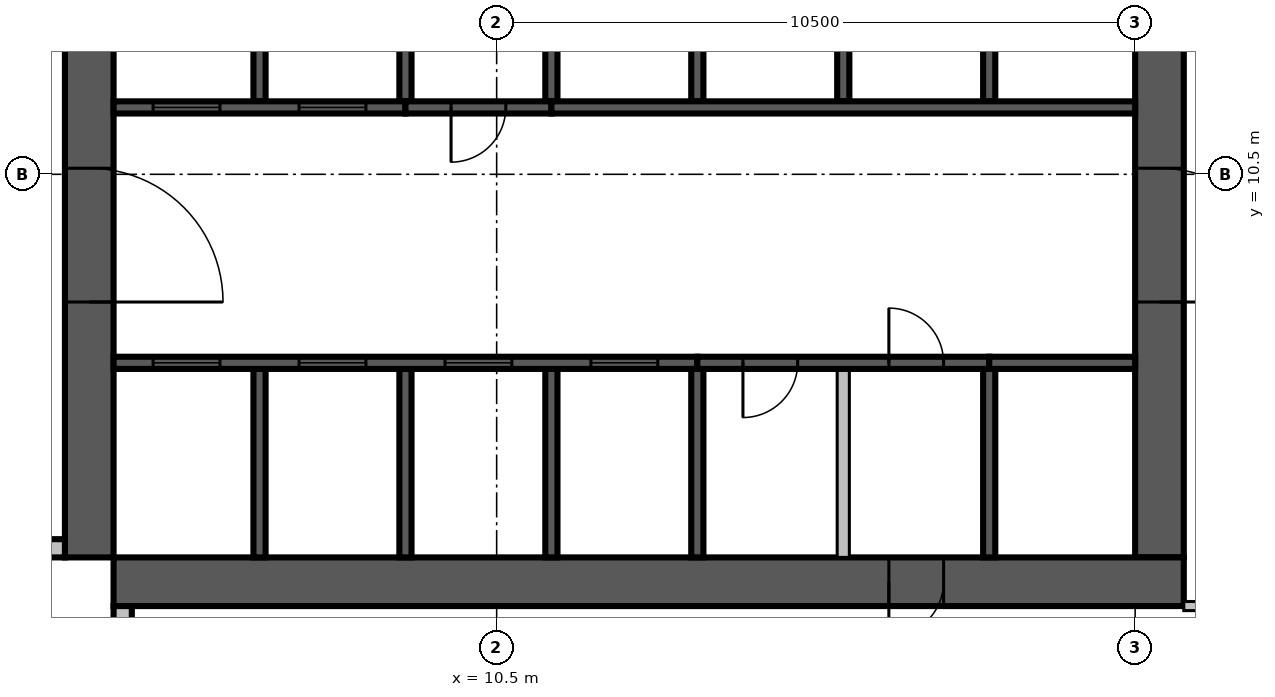
"""IFC4 building model, lengths in metres.
Left out: names, types, materials, properties, quantities, classifications, styles, units other than length and angle.
Written with IfcOpenShell. Run it as: python <this file> out.ifc"""

import sys

from ifc_helpers import new_model, si_unit, direction, frame, frame_2d, origin, place, context, subcontext, project, spatial, rectangle, extrude, source, transform, mapped, element, fill, save


model = new_model("IFC4")
c1 = context("Model", 3, precision=1e-05, world=origin(), true_north=direction((0.0, 1.0)))
c2 = subcontext(c1, "Body", "Model", "MODEL_VIEW")
j1 = project(units=[si_unit("LENGTHUNIT", "METRE"), si_unit("PLANEANGLEUNIT", "RADIAN")], contexts=[c1])
p1 = place(None, origin())
s1 = spatial("IfcSite", under=j1, at=p1, CompositionType="ELEMENT")
p2 = place(p1, origin())
s2 = spatial("IfcBuilding", under=s1, at=p2, CompositionType="ELEMENT")
p3 = place(p2, frame((0.0, 0.0, 200.6)))
s3 = spatial("IfcBuildingStorey", under=s2, at=p3, CompositionType="ELEMENT", Elevation=200.6)
m1 = source(origin(), c2, "Body", "SweptSolid", [
    extrude(rectangle(XDim=17.6, YDim=0.8, at=frame_2d((8.8, 0.0))), origin(), (0.0, 0.0, 1.0), 3.8),
])
p4 = place(p3, frame((3.8, 4.2, 0.0), z_axis=(0.0, 0.0, 1.0), x_axis=(0.0, 1.0, 0.0)))
e1 = element("IfcWall", 1, at=p4, inside=s3, PredefinedType="SHEAR", context=c2, shape_type="MappedRepresentation", body=[
    mapped(m1, transform((0.0, 0.0, 0.0), scale=1.0)),
])
m2 = source(origin(), c2, "Body", "SweptSolid", [
    extrude(rectangle(XDim=2.2, YDim=2.1, at=frame_2d((1.1, 1.05))), frame((0.0, 0.41, 0.0), z_axis=(0.0, -1.0, 0.0), x_axis=(1.0, 0.0, 0.0)), (0.0, 0.0, 1.0), 0.82),
])
p5 = place(p4, frame((4.2, 0.0, 0.0)))
e2 = element("IfcOpeningElement", 2, at=p5, cuts=e1, PredefinedType="OPENING", context=c2, shape_type="MappedRepresentation", body=[
    mapped(m2, transform((0.0, 0.0, 0.0), scale=1.0)),
])
m3 = source(origin(), c2, "Body", "SweptSolid", [
    extrude(rectangle(XDim=0.9, YDim=2.1, at=frame_2d((0.45, 1.05))), frame((0.0, 0.41, 0.0), z_axis=(0.0, -1.0, 0.0), x_axis=(1.0, 0.0, 0.0)), (0.0, 0.0, 1.0), 0.82),
])
p6 = place(p4, frame((10.95, 0.0, 0.0)))
e3 = element("IfcOpeningElement", 3, at=p6, cuts=e1, PredefinedType="OPENING", context=c2, shape_type="MappedRepresentation", body=[
    mapped(m3, transform((0.0, 0.0, 0.0), scale=1.0)),
])
m4 = source(origin(), c2, "Body", "SweptSolid", [
    extrude(rectangle(XDim=16.8, YDim=0.8, at=frame_2d((8.4, 0.0))), origin(), (0.0, 0.0, 1.0), 3.8),
])
p7 = place(p3, frame((21.4, 4.2, 0.0), z_axis=(0.0, 0.0, 1.0), x_axis=(0.0, 1.0, 0.0)))
e4 = element("IfcWall", 4, at=p7, inside=s3, PredefinedType="SHEAR", context=c2, shape_type="MappedRepresentation", body=[
    mapped(m4, transform((0.0, 0.0, 0.0), scale=1.0)),
])
p8 = place(p7, frame((4.2, 0.0, 0.0)))
e5 = element("IfcOpeningElement", 5, at=p8, cuts=e4, PredefinedType="OPENING", context=c2, shape_type="MappedRepresentation", body=[
    mapped(m2, transform((0.0, 0.0, 0.0), scale=1.0)),
])
m5 = source(origin(), c2, "Body", "SweptSolid", [
    extrude(rectangle(XDim=1.2, YDim=2.1, at=frame_2d((0.6, 1.05))), frame((0.0, 0.41, 0.0), z_axis=(0.0, -1.0, 0.0), x_axis=(1.0, 0.0, 0.0)), (0.0, 0.0, 1.0), 0.82),
])
p9 = place(p7, frame((14.7, 0.0, 0.0)))
e6 = element("IfcOpeningElement", 6, at=p9, cuts=e4, PredefinedType="OPENING", context=c2, shape_type="MappedRepresentation", body=[
    mapped(m5, transform((0.0, 0.0, 0.0), scale=1.0)),
])
p10 = place(p3, frame((4.2, 3.8, 0.0), z_axis=(0.0, 0.0, 1.0), x_axis=(1.0, 0.0, 0.0)))
e7 = element("IfcWall", 7, at=p10, inside=s3, PredefinedType="SHEAR", context=c2, shape_type="MappedRepresentation", body=[
    mapped(m1, transform((0.0, 0.0, 0.0), scale=1.0)),
])
p11 = place(p10, frame((12.75, 0.0, 0.0)))
e8 = element("IfcOpeningElement", 8, at=p11, cuts=e7, PredefinedType="OPENING", context=c2, shape_type="MappedRepresentation", body=[
    mapped(m3, transform((0.0, 0.0, 0.0), scale=1.0)),
])
m6 = source(origin(), c2, "Body", "SweptSolid", [
    extrude(rectangle(XDim=3.4, YDim=0.3, at=frame_2d((1.7, 0.0))), origin(), (0.0, 0.0, 1.0), 3.4),
])
p12 = place(p3, frame((0.0, 4.35, 0.0), z_axis=(0.0, 0.0, 1.0), x_axis=(1.0, 0.0, 0.0)))
e9 = element("IfcWall", 9, at=p12, inside=s3, PredefinedType="STANDARD", context=c2, shape_type="MappedRepresentation", body=[
    mapped(m6, transform((0.0, 0.0, 0.0), scale=1.0)),
])
m7 = source(origin(), c2, "Body", "SweptSolid", [
    extrude(rectangle(XDim=1.8, YDim=2.3, at=frame_2d((0.9, 1.15))), frame((0.0, 0.16, 0.0), z_axis=(0.0, -1.0, 0.0), x_axis=(1.0, 0.0, 0.0)), (0.0, 0.0, 1.0), 0.32),
])
p13 = place(p12, frame((1.2, 0.0, 0.6)))
e10 = element("IfcOpeningElement", 10, at=p13, cuts=e9, PredefinedType="OPENING", context=c2, shape_type="MappedRepresentation", body=[
    mapped(m7, transform((0.0, 0.0, 0.0), scale=1.0)),
])
p14 = place(p3, frame((4.35, 3.4, 0.0), z_axis=(0.0, 0.0, 1.0), x_axis=(0.0, -1.0, 0.0)))
e11 = element("IfcWall", 11, at=p14, inside=s3, PredefinedType="STANDARD", context=c2, shape_type="MappedRepresentation", body=[
    mapped(m6, transform((0.0, 0.0, 0.0), scale=1.0)),
])
p15 = place(p14, frame((0.4, 0.0, 0.6)))
e12 = element("IfcOpeningElement", 12, at=p15, cuts=e11, PredefinedType="OPENING", context=c2, shape_type="MappedRepresentation", body=[
    mapped(m7, transform((0.0, 0.0, 0.0), scale=1.0)),
])
m8 = source(origin(), c2, "Body", "SweptSolid", [
    extrude(rectangle(XDim=3.1, YDim=0.2, at=frame_2d((1.55, 0.0))), origin(), (0.0, 0.0, 1.0), 3.8),
])
for number, where, z_axis, x_axis in (
    (13, (6.6, 4.2, 0.0), (0.0, 0.0, 1.0), (0.0, 1.0, 0.0)),
    (14, (9.0, 4.2, 0.0), (0.0, 0.0, 1.0), (0.0, 1.0, 0.0)),
    (15, (11.4, 4.2, 0.0), (0.0, 0.0, 1.0), (0.0, 1.0, 0.0)),
):
    element("IfcWall", number, at=place(p3, frame(where, z_axis=z_axis, x_axis=x_axis)), inside=s3, PredefinedType="SOLIDWALL", context=c2, shape_type="MappedRepresentation", body=[
        mapped(m8, transform((0.0, 0.0, 0.0), scale=1.0)),
    ])
m9 = source(origin(), c2, "Body", "SweptSolid", [
    extrude(rectangle(XDim=3.1, YDim=0.2, at=frame_2d((1.55, 0.0))), origin(), (0.0, 0.0, 1.0), 3.4),
])
for number, where, z_axis, x_axis in (
    (16, (13.8, 4.2, 0.0), (0.0, 0.0, 1.0), (0.0, 1.0, 0.0)),
    (17, (18.6, 4.2, 0.0), (0.0, 0.0, 1.0), (0.0, 1.0, 0.0)),
):
    element("IfcWall", number, at=place(p3, frame(where, z_axis=z_axis, x_axis=x_axis)), inside=s3, PredefinedType="SOLIDWALL", context=c2, shape_type="MappedRepresentation", body=[
        mapped(m9, transform((0.0, 0.0, 0.0), scale=1.0)),
    ])
m10 = source(origin(), c2, "Body", "SweptSolid", [
    extrude(rectangle(XDim=3.1, YDim=0.2, at=frame_2d((1.55, 0.0))), origin(), (0.0, 0.0, 1.0), 3.4),
])
p16 = place(p3, frame((16.2, 4.2, 0.0), z_axis=(0.0, 0.0, 1.0), x_axis=(0.0, 1.0, 0.0)))
e18 = element("IfcWall", 18, at=p16, inside=s3, PredefinedType="PARTITIONING", context=c2, shape_type="MappedRepresentation", body=[
    mapped(m10, transform((0.0, 0.0, 0.0), scale=1.0)),
])
m11 = source(origin(), c2, "Body", "SweptSolid", [
    extrude(rectangle(XDim=3.0, YDim=0.2, at=frame_2d((1.5, 0.0))), origin(), (0.0, 0.0, 1.0), 3.8),
])
p17 = place(p3, frame((6.6, 11.7, 0.0), z_axis=(0.0, 0.0, 1.0), x_axis=(0.0, 1.0, 0.0)))
e19 = element("IfcWall", 19, at=p17, inside=s3, PredefinedType="SOLIDWALL", context=c2, shape_type="MappedRepresentation", body=[
    mapped(m11, transform((0.0, 0.0, 0.0), scale=1.0)),
])
m12 = source(origin(), c2, "Body", "SweptSolid", [
    extrude(rectangle(XDim=3.0, YDim=0.2, at=frame_2d((1.5, 0.0))), origin(), (0.0, 0.0, 1.0), 3.4),
])
for number, where, z_axis, x_axis in (
    (20, (9.0, 11.7, 0.0), (0.0, 0.0, 1.0), (0.0, 1.0, 0.0)),
    (21, (11.4, 11.7, 0.0), (0.0, 0.0, 1.0), (0.0, 1.0, 0.0)),
):
    element("IfcWall", number, at=place(p3, frame(where, z_axis=z_axis, x_axis=x_axis)), inside=s3, PredefinedType="SOLIDWALL", context=c2, shape_type="MappedRepresentation", body=[
        mapped(m12, transform((0.0, 0.0, 0.0), scale=1.0)),
    ])
for number, where, z_axis, x_axis in (
    (22, (13.8, 11.7, 0.0), (0.0, 0.0, 1.0), (0.0, 1.0, 0.0)),
    (23, (16.2, 11.7, 0.0), (0.0, 0.0, 1.0), (0.0, 1.0, 0.0)),
    (24, (18.6, 11.7, 0.0), (0.0, 0.0, 1.0), (0.0, 1.0, 0.0)),
):
    element("IfcWall", number, at=place(p3, frame(where, z_axis=z_axis, x_axis=x_axis)), inside=s3, PredefinedType="SOLIDWALL", context=c2, shape_type="MappedRepresentation", body=[
        mapped(m11, transform((0.0, 0.0, 0.0), scale=1.0)),
    ])
m13 = source(origin(), c2, "Body", "SweptSolid", [
    extrude(rectangle(XDim=9.6, YDim=0.2, at=frame_2d((4.8, 0.0))), origin(), (0.0, 0.0, 1.0), 3.8),
])
p18 = place(p3, frame((4.2, 7.4, 0.0), z_axis=(0.0, 0.0, 1.0), x_axis=(1.0, 0.0, 0.0)))
e25 = element("IfcWall", 25, at=p18, inside=s3, PredefinedType="SOLIDWALL", context=c2, shape_type="MappedRepresentation", body=[
    mapped(m13, transform((0.0, 0.0, 0.0), scale=1.0)),
])
m14 = source(origin(), c2, "Body", "SweptSolid", [
    extrude(rectangle(XDim=1.1, YDim=2.1, at=frame_2d((0.55, 1.05))), frame((0.0, 0.11, 0.0), z_axis=(0.0, -1.0, 0.0), x_axis=(1.0, 0.0, 0.0)), (0.0, 0.0, 1.0), 0.22),
])
p19 = place(p18, frame((0.65, 0.0, 0.0)))
e26 = element("IfcOpeningElement", 26, at=p19, cuts=e25, PredefinedType="OPENING", context=c2, shape_type="MappedRepresentation", body=[
    mapped(m14, transform((0.0, 0.0, 0.0), scale=1.0)),
])
p20 = place(p18, frame((3.05, 0.0, 0.0)))
e27 = element("IfcOpeningElement", 27, at=p20, cuts=e25, PredefinedType="OPENING", context=c2, shape_type="MappedRepresentation", body=[
    mapped(m14, transform((0.0, 0.0, 0.0), scale=1.0)),
])
p21 = place(p18, frame((5.45, 0.0, 0.0)))
e28 = element("IfcOpeningElement", 28, at=p21, cuts=e25, PredefinedType="OPENING", context=c2, shape_type="MappedRepresentation", body=[
    mapped(m14, transform((0.0, 0.0, 0.0), scale=1.0)),
])
p22 = place(p18, frame((7.85, 0.0, 0.0)))
e29 = element("IfcOpeningElement", 29, at=p22, cuts=e25, PredefinedType="OPENING", context=c2, shape_type="MappedRepresentation", body=[
    mapped(m14, transform((0.0, 0.0, 0.0), scale=1.0)),
])
m15 = source(origin(), c2, "Body", "SweptSolid", [
    extrude(rectangle(XDim=4.8, YDim=0.2, at=frame_2d((2.4, 0.0))), origin(), (0.0, 0.0, 1.0), 3.4),
])
p23 = place(p3, frame((13.8, 7.4, 0.0), z_axis=(0.0, 0.0, 1.0), x_axis=(1.0, 0.0, 0.0)))
e30 = element("IfcWall", 30, at=p23, inside=s3, PredefinedType="SOLIDWALL", context=c2, shape_type="MappedRepresentation", body=[
    mapped(m15, transform((0.0, 0.0, 0.0), scale=1.0)),
])
m16 = source(origin(), c2, "Body", "SweptSolid", [
    extrude(rectangle(XDim=0.9, YDim=2.1, at=frame_2d((0.45, 1.05))), frame((0.0, 0.11, 0.0), z_axis=(0.0, -1.0, 0.0), x_axis=(1.0, 0.0, 0.0)), (0.0, 0.0, 1.0), 0.22),
])
p24 = place(p23, frame((0.75, 0.0, 0.0)))
e31 = element("IfcOpeningElement", 31, at=p24, cuts=e30, PredefinedType="OPENING", context=c2, shape_type="MappedRepresentation", body=[
    mapped(m16, transform((0.0, 0.0, 0.0), scale=1.0)),
])
p25 = place(p23, frame((3.15, 0.0, 0.0)))
e32 = element("IfcOpeningElement", 32, at=p25, cuts=e30, PredefinedType="OPENING", context=c2, shape_type="MappedRepresentation", body=[
    mapped(m16, transform((0.0, 0.0, 0.0), scale=1.0)),
])
m17 = source(origin(), c2, "Body", "SweptSolid", [
    extrude(rectangle(XDim=2.4, YDim=0.2, at=frame_2d((1.2, 0.0))), origin(), (0.0, 0.0, 1.0), 3.8),
])
p26 = place(p3, frame((18.6, 7.4, 0.0), z_axis=(0.0, 0.0, 1.0), x_axis=(1.0, 0.0, 0.0)))
e33 = element("IfcWall", 33, at=p26, inside=s3, PredefinedType="SOLIDWALL", context=c2, shape_type="MappedRepresentation", body=[
    mapped(m17, transform((0.0, 0.0, 0.0), scale=1.0)),
])
m18 = source(origin(), c2, "Body", "SweptSolid", [
    extrude(rectangle(XDim=4.8, YDim=0.2, at=frame_2d((2.4, 0.0))), origin(), (0.0, 0.0, 1.0), 3.8),
])
p27 = place(p3, frame((4.2, 11.6, 0.0), z_axis=(0.0, 0.0, 1.0), x_axis=(1.0, 0.0, 0.0)))
e34 = element("IfcWall", 34, at=p27, inside=s3, PredefinedType="SOLIDWALL", context=c2, shape_type="MappedRepresentation", body=[
    mapped(m18, transform((0.0, 0.0, 0.0), scale=1.0)),
])
p28 = place(p27, frame((0.65, 0.0, 0.0)))
e35 = element("IfcOpeningElement", 35, at=p28, cuts=e34, PredefinedType="OPENING", context=c2, shape_type="MappedRepresentation", body=[
    mapped(m14, transform((0.0, 0.0, 0.0), scale=1.0)),
])
p29 = place(p27, frame((3.05, 0.0, 0.0)))
e36 = element("IfcOpeningElement", 36, at=p29, cuts=e34, PredefinedType="OPENING", context=c2, shape_type="MappedRepresentation", body=[
    mapped(m14, transform((0.0, 0.0, 0.0), scale=1.0)),
])
m19 = source(origin(), c2, "Body", "SweptSolid", [
    extrude(rectangle(XDim=2.4, YDim=0.2, at=frame_2d((1.2, 0.0))), origin(), (0.0, 0.0, 1.0), 3.4),
])
p30 = place(p3, frame((9.0, 11.6, 0.0), z_axis=(0.0, 0.0, 1.0), x_axis=(1.0, 0.0, 0.0)))
e37 = element("IfcWall", 37, at=p30, inside=s3, PredefinedType="SOLIDWALL", context=c2, shape_type="MappedRepresentation", body=[
    mapped(m19, transform((0.0, 0.0, 0.0), scale=1.0)),
])
p31 = place(p30, frame((0.75, 0.0, 0.0)))
e38 = element("IfcOpeningElement", 38, at=p31, cuts=e37, PredefinedType="OPENING", context=c2, shape_type="MappedRepresentation", body=[
    mapped(m16, transform((0.0, 0.0, 0.0), scale=1.0)),
])
p32 = place(p3, frame((11.4, 11.6, 0.0), z_axis=(0.0, 0.0, 1.0), x_axis=(1.0, 0.0, 0.0)))
e39 = element("IfcWall", 39, at=p32, inside=s3, PredefinedType="SOLIDWALL", context=c2, shape_type="MappedRepresentation", body=[
    mapped(m13, transform((0.0, 0.0, 0.0), scale=1.0)),
])
m20 = source(origin(), c2, "Body", "SweptSolid", [
    extrude(rectangle(XDim=7.525, YDim=0.15, at=frame_2d((3.763, 0.0))), origin(), (0.0, 0.0, 1.0), 3.4),
])
p33 = place(p3, frame((21.8, 3.4, 0.0), z_axis=(0.0, 0.0, 1.0), x_axis=(1.0, 0.0, 0.0)))
e40 = element("IfcWall", 40, at=p33, inside=s3, PredefinedType="PARTITIONING", context=c2, shape_type="MappedRepresentation", body=[
    mapped(m20, transform((0.0, 0.0, 0.0), scale=1.0)),
])
m21 = source(origin(), c2, "Body", "SweptSolid", [
    extrude(rectangle(XDim=1.0, YDim=2.1, at=frame_2d((0.5, 1.05))), frame((0.0, 0.085, 0.0), z_axis=(0.0, -1.0, 0.0), x_axis=(1.0, 0.0, 0.0)), (0.0, 0.0, 1.0), 0.17),
])
p34 = place(p33, frame((3.3, 0.0, 0.0)))
e41 = element("IfcOpeningElement", 41, at=p34, cuts=e40, PredefinedType="OPENING", context=c2, shape_type="MappedRepresentation", body=[
    mapped(m21, transform((0.0, 0.0, 0.0), scale=1.0)),
])
m22 = source(origin(), c2, "Body", "SweptSolid", [
    extrude(rectangle(XDim=0.9, YDim=2.1, at=frame_2d((0.45, 1.05))), frame((0.0, 0.085, 0.0), z_axis=(0.0, -1.0, 0.0), x_axis=(1.0, 0.0, 0.0)), (0.0, 0.0, 1.0), 0.17),
])
p35 = place(p33, frame((4.363, 0.0, 0.0)))
e42 = element("IfcOpeningElement", 42, at=p35, cuts=e40, PredefinedType="OPENING", context=c2, shape_type="MappedRepresentation", body=[
    mapped(m22, transform((0.0, 0.0, 0.0), scale=1.0)),
])
m23 = source(origin(), c2, "Body", "SweptSolid", [
    extrude(rectangle(XDim=1.1, YDim=2.1, at=frame_2d((0.55, 1.05))), frame((0.0, 0.025, 0.0), z_axis=(0.0, -1.0, 0.0), x_axis=(1.0, 0.0, 0.0)), (0.0, 0.0, 1.0), 0.05),
])
p36 = place(p19, origin())
e43 = element("IfcDoor", 43, at=p36, inside=s3, OperationType="SLIDING_TO_LEFT", PredefinedType="DOOR", context=c2, shape_type="MappedRepresentation", body=[
    mapped(m23, transform((0.0, 0.0, 0.0), scale=1.0)),
])
fill(e26, e43)
p37 = place(p20, origin())
e44 = element("IfcDoor", 44, at=p37, inside=s3, OperationType="SLIDING_TO_LEFT", PredefinedType="DOOR", context=c2, shape_type="MappedRepresentation", body=[
    mapped(m23, transform((0.0, 0.0, 0.0), scale=1.0)),
])
fill(e27, e44)
p38 = place(p21, origin())
e45 = element("IfcDoor", 45, at=p38, inside=s3, OperationType="SLIDING_TO_LEFT", PredefinedType="DOOR", context=c2, shape_type="MappedRepresentation", body=[
    mapped(m23, transform((0.0, 0.0, 0.0), scale=1.0)),
])
fill(e28, e45)
p39 = place(p22, origin())
e46 = element("IfcDoor", 46, at=p39, inside=s3, OperationType="SLIDING_TO_LEFT", PredefinedType="DOOR", context=c2, shape_type="MappedRepresentation", body=[
    mapped(m23, transform((0.0, 0.0, 0.0), scale=1.0)),
])
fill(e29, e46)
m24 = source(origin(), c2, "Body", "SweptSolid", [
    extrude(rectangle(XDim=0.9, YDim=2.1, at=frame_2d((0.45, 1.05))), frame((0.0, 0.025, 0.0), z_axis=(0.0, -1.0, 0.0), x_axis=(1.0, 0.0, 0.0)), (0.0, 0.0, 1.0), 0.05),
])
p40 = place(p24, origin())
e47 = element("IfcDoor", 47, at=p40, inside=s3, OperationType="SINGLE_SWING_RIGHT", PredefinedType="DOOR", context=c2, shape_type="MappedRepresentation", body=[
    mapped(m24, transform((0.0, 0.0, 0.0), scale=1.0)),
])
fill(e31, e47)
p41 = place(p25, origin())
e48 = element("IfcDoor", 48, at=p41, inside=s3, OperationType="SINGLE_SWING_LEFT", PredefinedType="DOOR", context=c2, shape_type="MappedRepresentation", body=[
    mapped(m24, transform((0.0, 0.0, 0.0), scale=1.0)),
])
fill(e32, e48)
p42 = place(p28, origin())
e49 = element("IfcDoor", 49, at=p42, inside=s3, OperationType="SLIDING_TO_LEFT", PredefinedType="DOOR", context=c2, shape_type="MappedRepresentation", body=[
    mapped(m23, transform((0.0, 0.0, 0.0), scale=1.0)),
])
fill(e35, e49)
p43 = place(p29, origin())
e50 = element("IfcDoor", 50, at=p43, inside=s3, OperationType="SLIDING_TO_LEFT", PredefinedType="DOOR", context=c2, shape_type="MappedRepresentation", body=[
    mapped(m23, transform((0.0, 0.0, 0.0), scale=1.0)),
])
fill(e36, e50)
p44 = place(p31, origin())
e51 = element("IfcDoor", 51, at=p44, inside=s3, OperationType="SINGLE_SWING_RIGHT", PredefinedType="DOOR", context=c2, shape_type="MappedRepresentation", body=[
    mapped(m24, transform((0.0, 0.0, 0.0), scale=1.0)),
])
fill(e38, e51)
m25 = source(origin(), c2, "Body", "SweptSolid", [
    extrude(rectangle(XDim=2.2, YDim=2.1, at=frame_2d((1.1, 1.05))), frame((0.0, 0.025, 0.0), z_axis=(0.0, -1.0, 0.0), x_axis=(1.0, 0.0, 0.0)), (0.0, 0.0, 1.0), 0.05),
])
p45 = place(p8, origin())
e52 = element("IfcDoor", 52, at=p45, inside=s3, OperationType="DOUBLE_DOOR_SINGLE_SWING", PredefinedType="DOOR", context=c2, shape_type="MappedRepresentation", body=[
    mapped(m25, transform((0.0, 0.0, 0.0), scale=1.0)),
])
fill(e5, e52)
p46 = place(p5, origin())
e53 = element("IfcDoor", 53, at=p46, inside=s3, OperationType="DOUBLE_DOOR_SINGLE_SWING", PredefinedType="DOOR", context=c2, shape_type="MappedRepresentation", body=[
    mapped(m25, transform((0.0, 0.0, 0.0), scale=1.0)),
])
fill(e2, e53)
p47 = place(p11, origin())
e54 = element("IfcDoor", 54, at=p47, inside=s3, OperationType="SINGLE_SWING_RIGHT", PredefinedType="DOOR", context=c2, shape_type="MappedRepresentation", body=[
    mapped(m24, transform((0.0, 0.0, 0.0), scale=1.0)),
])
fill(e8, e54)
save(model, sys.argv[1])
